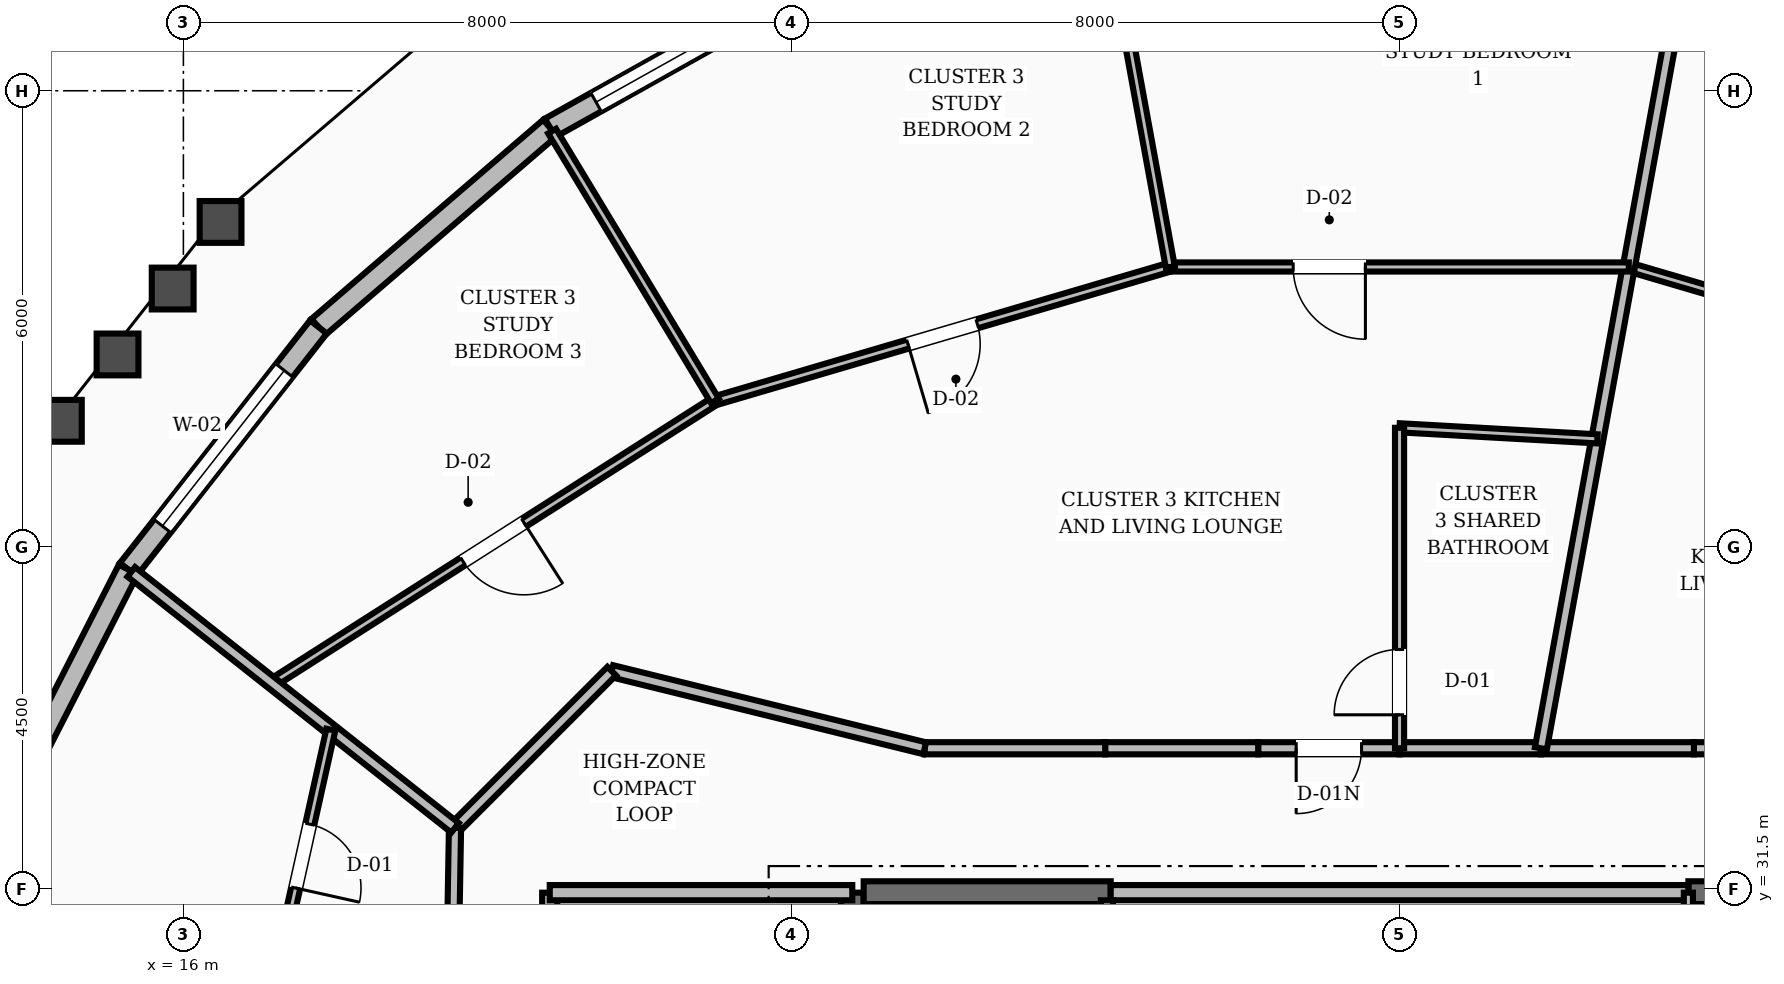
"""IFC4 building model, lengths in metres.
Left out: names, types, materials, properties, quantities, classifications, styles, units other than length and angle.
Written with IfcOpenShell. Run it as: python <this file> out.ifc"""

import sys

from ifc_helpers import new_model, si_unit, direction, frame, frame_2d, origin, place, context, subcontext, project, spatial, rectangle, extrude, element, fill, save


model = new_model("IFC4")
c1 = context("Model", 3, precision=1e-05, world=origin(), true_north=direction((0.0, 1.0)))
c2 = subcontext(c1, "Body", "Model", "MODEL_VIEW")
j1 = project(units=[si_unit("LENGTHUNIT", "METRE"), si_unit("PLANEANGLEUNIT", "RADIAN")], contexts=[c1])
p1 = place(None, origin())
s1 = spatial("IfcSite", under=j1, at=p1, CompositionType="ELEMENT")
p2 = place(p1, origin())
s2 = spatial("IfcBuilding", under=s1, at=p2, CompositionType="ELEMENT")
p3 = place(p2, frame((0.0, 0.0, 261.6)))
s3 = spatial("IfcBuildingStorey", under=s2, at=p3, CompositionType="ELEMENT", Elevation=261.6)
p4 = place(p3, frame((24.8, 25.15, 0.0), z_axis=(0.0, 0.0, 1.0), x_axis=(0.0, 1.0, 0.0)))
e1 = element("IfcWall", 1, at=p4, inside=s3, PredefinedType="SHEAR", context=c2, shape_type="SweptSolid", body=[
    extrude(rectangle(XDim=6.3, YDim=0.3, at=frame_2d((3.15, 0.0))), origin(), (0.0, 0.0, 1.0), 3.6),
])
p5 = place(p3, frame((24.95, 31.45, 0.0), z_axis=(0.0, 0.0, 1.0), x_axis=(1.0, 0.0, 0.0)))
e2 = element("IfcWall", 2, at=p5, inside=s3, PredefinedType="SHEAR", context=c2, shape_type="SweptSolid", body=[
    extrude(rectangle(XDim=3.25, YDim=0.3, at=frame_2d((1.625, 0.0))), origin(), (0.0, 0.0, 1.0), 3.6),
])
p6 = place(p3, frame((35.8, 31.45, 0.0), z_axis=(0.0, 0.0, 1.0), x_axis=(1.0, 0.0, 0.0)))
e3 = element("IfcWall", 3, at=p6, inside=s3, PredefinedType="SHEAR", context=c2, shape_type="SweptSolid", body=[
    extrude(rectangle(XDim=3.25, YDim=0.3, at=frame_2d((1.625, 0.0))), origin(), (0.0, 0.0, 1.0), 3.6),
])
p7 = place(p6, frame((0.3, 0.0, 0.0)))
e4 = element("IfcOpeningElement", 4, at=p7, cuts=e3, PredefinedType="OPENING", context=c2, shape_type="SweptSolid", body=[
    extrude(rectangle(XDim=1.1, YDim=2.1, at=frame_2d((0.55, 1.05))), frame((0.0, 0.16, 0.0), z_axis=(0.0, -1.0, 0.0), x_axis=(1.0, 0.0, 0.0)), (0.0, 0.0, 1.0), 0.32),
])
p8 = place(p3, frame((24.302, 43.458, 0.0), z_axis=(0.0, 0.0, 1.0), x_axis=(-0.872627171538, -0.488386956719, 0.0)))
e5 = element("IfcWall", 5, at=p8, inside=s3, PredefinedType="STANDARD", context=c2, shape_type="SweptSolid", body=[
    extrude(rectangle(XDim=3.985, YDim=0.28, at=frame_2d((1.993, 0.0))), origin(), (0.0, 0.0, 1.0), 2.88),
])
p9 = place(p8, frame((0.693, 0.0, 0.8)))
e6 = element("IfcOpeningElement", 6, at=p9, cuts=e5, PredefinedType="OPENING", context=c2, shape_type="SweptSolid", body=[
    extrude(rectangle(XDim=2.6, YDim=1.65, at=frame_2d((1.3, 0.825))), frame((0.0, 0.15, 0.0), z_axis=(0.0, -1.0, 0.0), x_axis=(1.0, 0.0, 0.0)), (0.0, 0.0, 1.0), 0.3),
])
p10 = place(p3, frame((20.825, 41.512, 0.0), z_axis=(0.0, 0.0, 1.0), x_axis=(-0.758458425967, -0.651721425212, 0.0)))
e7 = element("IfcWall", 7, at=p10, inside=s3, PredefinedType="STANDARD", context=c2, shape_type="SweptSolid", body=[
    extrude(rectangle(XDim=4.019, YDim=0.28, at=frame_2d((2.009, 0.0))), origin(), (0.0, 0.0, 1.0), 2.88),
])
p11 = place(p3, frame((17.777, 38.893, 0.0), z_axis=(0.0, 0.0, 1.0), x_axis=(-0.616903837432, -0.787038534864, 0.0)))
e8 = element("IfcWall", 8, at=p11, inside=s3, PredefinedType="STANDARD", context=c2, shape_type="SweptSolid", body=[
    extrude(rectangle(XDim=4.055, YDim=0.28, at=frame_2d((2.028, 0.0))), origin(), (0.0, 0.0, 1.0), 2.88),
])
p12 = place(p11, frame((0.728, 0.0, 0.8)))
e9 = element("IfcOpeningElement", 9, at=p12, cuts=e8, PredefinedType="OPENING", context=c2, shape_type="SweptSolid", body=[
    extrude(rectangle(XDim=2.6, YDim=1.65, at=frame_2d((1.3, 0.825))), frame((0.0, 0.15, 0.0), z_axis=(0.0, -1.0, 0.0), x_axis=(1.0, 0.0, 0.0)), (0.0, 0.0, 1.0), 0.3),
])
p13 = place(p3, frame((15.275, 35.701, 0.0), z_axis=(0.0, 0.0, 1.0), x_axis=(-0.454698544749, -0.89064540273, 0.0)))
e10 = element("IfcWall", 10, at=p13, inside=s3, PredefinedType="STANDARD", context=c2, shape_type="SweptSolid", body=[
    extrude(rectangle(XDim=4.088, YDim=0.28, at=frame_2d((2.044, 0.0))), origin(), (0.0, 0.0, 1.0), 2.88),
])
p14 = place(p3, frame((20.82, 28.32, 0.0), z_axis=(0.0, 0.0, 1.0), x_axis=(0.0, 1.0, 0.0)))
e11 = element("IfcWall", 11, at=p14, inside=s3, PredefinedType="SOLIDWALL", context=c2, shape_type="SweptSolid", body=[
    extrude(rectangle(XDim=3.13, YDim=0.2, at=frame_2d((1.565, 0.0))), origin(), (0.0, 0.0, 1.0), 2.87),
])
p15 = place(p14, frame((1.09, 0.0, 0.0)))
e12 = element("IfcOpeningElement", 12, at=p15, cuts=e11, PredefinedType="OPENING", context=c2, shape_type="SweptSolid", body=[
    extrude(rectangle(XDim=0.95, YDim=2.1, at=frame_2d((0.475, 1.05))), frame((0.0, 0.11, 0.0), z_axis=(0.0, -1.0, 0.0), x_axis=(1.0, 0.0, 0.0)), (0.0, 0.0, 1.0), 0.22),
])
p16 = place(p3, frame((20.82, 31.45, 0.0), z_axis=(0.0, 0.0, 1.0), x_axis=(1.0, 0.0, 0.0)))
e13 = element("IfcWall", 13, at=p16, inside=s3, PredefinedType="SOLIDWALL", context=c2, shape_type="SweptSolid", body=[
    extrude(rectangle(XDim=3.98, YDim=0.2, at=frame_2d((1.99, 0.0))), origin(), (0.0, 0.0, 1.0), 2.87),
])
p17 = place(p3, frame((28.2, 31.45, 0.0), z_axis=(0.0, 0.0, 1.0), x_axis=(1.0, 0.0, 0.0)))
e14 = element("IfcWall", 14, at=p17, inside=s3, PredefinedType="SOLIDWALL", context=c2, shape_type="SweptSolid", body=[
    extrude(rectangle(XDim=7.6, YDim=0.2, at=frame_2d((3.8, 0.0))), origin(), (0.0, 0.0, 1.0), 2.87),
])
p18 = place(p3, frame((35.8, 27.95, 0.0), z_axis=(0.0, 0.0, 1.0), x_axis=(0.0, 1.0, 0.0)))
e15 = element("IfcWall", 15, at=p18, inside=s3, PredefinedType="PARTITIONING", context=c2, shape_type="SweptSolid", body=[
    extrude(rectangle(XDim=3.5, YDim=0.12, at=frame_2d((1.75, 0.0))), origin(), (0.0, 0.0, 1.0), 2.87),
])
p19 = place(p18, frame((1.275, 0.0, 0.0)))
e16 = element("IfcOpeningElement", 16, at=p19, cuts=e15, PredefinedType="OPENING", context=c2, shape_type="SweptSolid", body=[
    extrude(rectangle(XDim=0.95, YDim=2.1, at=frame_2d((0.475, 1.05))), frame((0.0, 0.07, 0.0), z_axis=(0.0, -1.0, 0.0), x_axis=(1.0, 0.0, 0.0)), (0.0, 0.0, 1.0), 0.14),
])
p20 = place(p3, frame((28.15, 25.25, 0.0), z_axis=(0.0, 0.0, 1.0), x_axis=(0.0, 1.0, 0.0)))
e17 = element("IfcWall", 17, at=p20, inside=s3, PredefinedType="SOLIDWALL", context=c2, shape_type="SweptSolid", body=[
    extrude(rectangle(XDim=6.1, YDim=0.16, at=frame_2d((3.05, 0.0))), origin(), (0.0, 0.0, 1.0), 2.87),
])
p21 = place(p3, frame((38.248, 33.35, 0.0), z_axis=(0.0, 0.0, 1.0), x_axis=(-1.0, 0.0, 0.0)))
e18 = element("IfcWall", 18, at=p21, inside=s3, PredefinedType="SOLIDWALL", context=c2, shape_type="SweptSolid", body=[
    extrude(rectangle(XDim=2.375, YDim=0.16, at=frame_2d((1.188, 0.0))), origin(), (0.0, 0.0, 1.0), 2.87),
])
p22 = place(p3, frame((35.873, 33.35, 0.0), z_axis=(0.0, 0.0, 1.0), x_axis=(-1.0, 0.0, 0.0)))
e19 = element("IfcWall", 19, at=p22, inside=s3, PredefinedType="SOLIDWALL", context=c2, shape_type="SweptSolid", body=[
    extrude(rectangle(XDim=2.013, YDim=0.16, at=frame_2d((1.006, 0.0))), origin(), (0.0, 0.0, 1.0), 2.87),
])
p23 = place(p3, frame((33.86, 33.35, 0.0), z_axis=(0.0, 0.0, 1.0), x_axis=(-1.0, 0.0, 0.0)))
e20 = element("IfcWall", 20, at=p23, inside=s3, PredefinedType="SOLIDWALL", context=c2, shape_type="SweptSolid", body=[
    extrude(rectangle(XDim=1.86, YDim=0.16, at=frame_2d((0.93, 0.0))), origin(), (0.0, 0.0, 1.0), 2.87),
])
p24 = place(p3, frame((32.0, 33.35, 0.0), z_axis=(0.0, 0.0, 1.0), x_axis=(-1.0, 0.0, 0.0)))
e21 = element("IfcWall", 21, at=p24, inside=s3, PredefinedType="SOLIDWALL", context=c2, shape_type="SweptSolid", body=[
    extrude(rectangle(XDim=1.86, YDim=0.16, at=frame_2d((0.93, 0.0))), origin(), (0.0, 0.0, 1.0), 2.87),
])
p25 = place(p24, frame((0.5, 0.0, 0.0)))
e22 = element("IfcOpeningElement", 22, at=p25, cuts=e21, PredefinedType="OPENING", context=c2, shape_type="SweptSolid", body=[
    extrude(rectangle(XDim=0.86, YDim=2.1, at=frame_2d((0.43, 1.05))), frame((0.0, 0.09, 0.0), z_axis=(0.0, -1.0, 0.0), x_axis=(1.0, 0.0, 0.0)), (0.0, 0.0, 1.0), 0.18),
])
p26 = place(p3, frame((30.14, 33.35, 0.0), z_axis=(0.0, 0.0, 1.0), x_axis=(-1.0, 0.0, 0.0)))
e23 = element("IfcWall", 23, at=p26, inside=s3, PredefinedType="SOLIDWALL", context=c2, shape_type="SweptSolid", body=[
    extrude(rectangle(XDim=2.013, YDim=0.16, at=frame_2d((1.006, 0.0))), origin(), (0.0, 0.0, 1.0), 2.87),
])
p27 = place(p3, frame((28.127, 33.35, 0.0), z_axis=(0.0, 0.0, 1.0), x_axis=(-1.0, 0.0, 0.0)))
e24 = element("IfcWall", 24, at=p27, inside=s3, PredefinedType="SOLIDWALL", context=c2, shape_type="SweptSolid", body=[
    extrude(rectangle(XDim=2.375, YDim=0.16, at=frame_2d((1.188, 0.0))), origin(), (0.0, 0.0, 1.0), 2.87),
])
p28 = place(p3, frame((25.752, 33.35, 0.0), z_axis=(0.0, 0.0, 1.0), x_axis=(-0.970939799552, 0.239323850978, 0.0)))
e25 = element("IfcWall", 25, at=p28, inside=s3, PredefinedType="SOLIDWALL", context=c2, shape_type="SweptSolid", body=[
    extrude(rectangle(XDim=4.241, YDim=0.16, at=frame_2d((2.12, 0.0))), origin(), (0.0, 0.0, 1.0), 2.87),
])
p29 = place(p3, frame((21.635, 34.365, 0.0), z_axis=(0.0, 0.0, 1.0), x_axis=(-0.707106781187, -0.707106781187, 0.0)))
e26 = element("IfcWall", 26, at=p29, inside=s3, PredefinedType="SOLIDWALL", context=c2, shape_type="SweptSolid", body=[
    extrude(rectangle(XDim=2.916, YDim=0.16, at=frame_2d((1.458, 0.0))), origin(), (0.0, 0.0, 1.0), 2.87),
])
p30 = place(p3, frame((19.573, 32.303, 0.0), z_axis=(0.0, 0.0, 1.0), x_axis=(-0.016981035134, -0.999855811828, 0.0)))
e27 = element("IfcWall", 27, at=p30, inside=s3, PredefinedType="SOLIDWALL", context=c2, shape_type="SweptSolid", body=[
    extrude(rectangle(XDim=3.134, YDim=0.16, at=frame_2d((1.567, 0.0))), origin(), (0.0, 0.0, 1.0), 2.87),
])
p31 = place(p3, frame((41.007, 37.921, 0.0), z_axis=(0.0, 0.0, 1.0), x_axis=(-0.959414668212, 0.281999103578, 0.0)))
e28 = element("IfcWall", 28, at=p31, inside=s3, PredefinedType="PARTITIONING", context=c2, shape_type="SweptSolid", body=[
    extrude(rectangle(XDim=6.245, YDim=0.12, at=frame_2d((3.122, 0.0))), origin(), (0.0, 0.0, 1.0), 2.87),
])
p32 = place(p31, frame((2.647, 0.0, 0.0)))
e29 = element("IfcOpeningElement", 29, at=p32, cuts=e28, PredefinedType="OPENING", context=c2, shape_type="SweptSolid", body=[
    extrude(rectangle(XDim=0.95, YDim=2.1, at=frame_2d((0.475, 1.05))), frame((0.0, 0.07, 0.0), z_axis=(0.0, -1.0, 0.0), x_axis=(1.0, 0.0, 0.0)), (0.0, 0.0, 1.0), 0.14),
])
p33 = place(p3, frame((33.86, 33.35, 0.0), z_axis=(0.0, 0.0, 1.0), x_axis=(0.17961571379, 0.9837368527, 0.0)))
e30 = element("IfcWall", 30, at=p33, inside=s3, PredefinedType="SOLIDWALL", context=c2, shape_type="SweptSolid", body=[
    extrude(rectangle(XDim=11.443, YDim=0.16, at=frame_2d((5.722, 0.0))), origin(), (0.0, 0.0, 1.0), 2.87),
])
p34 = place(p3, frame((34.603, 37.42, 0.0), z_axis=(0.0, 0.0, 1.0), x_axis=(-0.998441277422, 0.055812324268, 0.0)))
e31 = element("IfcWall", 31, at=p34, inside=s3, PredefinedType="PARTITIONING", context=c2, shape_type="SweptSolid", body=[
    extrude(rectangle(XDim=2.607, YDim=0.12, at=frame_2d((1.304, 0.0))), origin(), (0.0, 0.0, 1.0), 2.87),
])
p35 = place(p3, frame((32.0, 33.35, 0.0), z_axis=(0.0, 0.0, 1.0), x_axis=(0.0, 1.0, 0.0)))
e32 = element("IfcWall", 32, at=p35, inside=s3, PredefinedType="PARTITIONING", context=c2, shape_type="SweptSolid", body=[
    extrude(rectangle(XDim=4.216, YDim=0.12, at=frame_2d((2.108, 0.0))), origin(), (0.0, 0.0, 1.0), 2.87),
])
p36 = place(p35, frame((0.44, 0.0, 0.0)))
e33 = element("IfcOpeningElement", 33, at=p36, cuts=e32, PredefinedType="OPENING", context=c2, shape_type="SweptSolid", body=[
    extrude(rectangle(XDim=0.86, YDim=2.1, at=frame_2d((0.43, 1.05))), frame((0.0, 0.07, 0.0), z_axis=(0.0, -1.0, 0.0), x_axis=(1.0, 0.0, 0.0)), (0.0, 0.0, 1.0), 0.14),
])
p37 = place(p3, frame((35.016, 39.682, 0.0), z_axis=(0.0, 0.0, 1.0), x_axis=(-1.0, 0.0, 0.0)))
e34 = element("IfcWall", 34, at=p37, inside=s3, PredefinedType="PARTITIONING", context=c2, shape_type="SweptSolid", body=[
    extrude(rectangle(XDim=6.032, YDim=0.12, at=frame_2d((3.016, 0.0))), origin(), (0.0, 0.0, 1.0), 2.87),
])
p38 = place(p37, frame((3.465, 0.0, 0.0)))
e35 = element("IfcOpeningElement", 35, at=p38, cuts=e34, PredefinedType="OPENING", context=c2, shape_type="SweptSolid", body=[
    extrude(rectangle(XDim=0.95, YDim=2.1, at=frame_2d((0.475, 1.05))), frame((0.0, 0.07, 0.0), z_axis=(0.0, -1.0, 0.0), x_axis=(1.0, 0.0, 0.0)), (0.0, 0.0, 1.0), 0.14),
])
p39 = place(p3, frame((28.984, 39.682, 0.0), z_axis=(0.0, 0.0, 1.0), x_axis=(-0.959414668212, -0.281999103578, 0.0)))
e36 = element("IfcWall", 36, at=p39, inside=s3, PredefinedType="PARTITIONING", context=c2, shape_type="SweptSolid", body=[
    extrude(rectangle(XDim=6.245, YDim=0.12, at=frame_2d((3.122, 0.0))), origin(), (0.0, 0.0, 1.0), 2.87),
])
p40 = place(p39, frame((2.647, 0.0, 0.0)))
e37 = element("IfcOpeningElement", 37, at=p40, cuts=e36, PredefinedType="OPENING", context=c2, shape_type="SweptSolid", body=[
    extrude(rectangle(XDim=0.95, YDim=2.1, at=frame_2d((0.475, 1.05))), frame((0.0, 0.07, 0.0), z_axis=(0.0, -1.0, 0.0), x_axis=(1.0, 0.0, 0.0)), (0.0, 0.0, 1.0), 0.14),
])
p41 = place(p3, frame((28.984, 39.682, 0.0), z_axis=(0.0, 0.0, 1.0), x_axis=(-0.179623384496, 0.983735452112, 0.0)))
e38 = element("IfcWall", 38, at=p41, inside=s3, PredefinedType="PARTITIONING", context=c2, shape_type="SweptSolid", body=[
    extrude(rectangle(XDim=5.007, YDim=0.12, at=frame_2d((2.504, 0.0))), origin(), (0.0, 0.0, 1.0), 2.87),
])
p42 = place(p3, frame((22.993, 37.921, 0.0), z_axis=(0.0, 0.0, 1.0), x_axis=(-0.843220391553, -0.537568015482, 0.0)))
e39 = element("IfcWall", 39, at=p42, inside=s3, PredefinedType="PARTITIONING", context=c2, shape_type="SweptSolid", body=[
    extrude(rectangle(XDim=6.91, YDim=0.12, at=frame_2d((3.455, 0.0))), origin(), (0.0, 0.0, 1.0), 2.87),
])
p43 = place(p42, frame((2.98, 0.0, 0.0)))
e40 = element("IfcOpeningElement", 40, at=p43, cuts=e39, PredefinedType="OPENING", context=c2, shape_type="SweptSolid", body=[
    extrude(rectangle(XDim=0.95, YDim=2.1, at=frame_2d((0.475, 1.05))), frame((0.0, 0.07, 0.0), z_axis=(0.0, -1.0, 0.0), x_axis=(1.0, 0.0, 0.0)), (0.0, 0.0, 1.0), 0.14),
])
p44 = place(p3, frame((22.993, 37.921, 0.0), z_axis=(0.0, 0.0, 1.0), x_axis=(-0.516901675456, 0.856044775646, 0.0)))
e41 = element("IfcWall", 41, at=p44, inside=s3, PredefinedType="PARTITIONING", context=c2, shape_type="SweptSolid", body=[
    extrude(rectangle(XDim=4.145, YDim=0.12, at=frame_2d((2.073, 0.0))), origin(), (0.0, 0.0, 1.0), 2.87),
])
p45 = place(p3, frame((19.573, 32.303, 0.0), z_axis=(0.0, 0.0, 1.0), x_axis=(-0.784496994248, 0.6201326197, 0.0)))
e42 = element("IfcWall", 42, at=p45, inside=s3, PredefinedType="SOLIDWALL", context=c2, shape_type="SweptSolid", body=[
    extrude(rectangle(XDim=5.429, YDim=0.16, at=frame_2d((2.714, 0.0))), origin(), (0.0, 0.0, 1.0), 2.87),
])
p46 = place(p3, frame((17.94, 33.594, 0.0), z_axis=(0.0, 0.0, 1.0), x_axis=(-0.216998726361, -0.976171886892, 0.0)))
e43 = element("IfcWall", 43, at=p46, inside=s3, PredefinedType="PARTITIONING", context=c2, shape_type="SweptSolid", body=[
    extrude(rectangle(XDim=3.408, YDim=0.12, at=frame_2d((1.704, 0.0))), origin(), (0.0, 0.0, 1.0), 2.87),
])
p47 = place(p46, frame((1.274, 0.0, 0.0)))
e44 = element("IfcOpeningElement", 44, at=p47, cuts=e43, PredefinedType="OPENING", context=c2, shape_type="SweptSolid", body=[
    extrude(rectangle(XDim=0.86, YDim=2.1, at=frame_2d((0.43, 1.05))), frame((0.0, 0.07, 0.0), z_axis=(0.0, -1.0, 0.0), x_axis=(1.0, 0.0, 0.0)), (0.0, 0.0, 1.0), 0.14),
])
p48 = place(p9, origin())
e45 = element("IfcWindow", 45, at=p48, inside=s3, PartitioningType="SINGLE_PANEL", PredefinedType="WINDOW", context=c2, shape_type="SweptSolid", body=[
    extrude(rectangle(XDim=2.6, YDim=1.65, at=frame_2d((1.3, 0.825))), frame((0.0, 0.03, 0.0), z_axis=(0.0, -1.0, 0.0), x_axis=(1.0, 0.0, 0.0)), (0.0, 0.0, 1.0), 0.06),
])
fill(e6, e45)
p49 = place(p12, origin())
e46 = element("IfcWindow", 46, at=p49, inside=s3, PartitioningType="SINGLE_PANEL", PredefinedType="WINDOW", context=c2, shape_type="SweptSolid", body=[
    extrude(rectangle(XDim=2.6, YDim=1.65, at=frame_2d((1.3, 0.825))), frame((0.0, 0.03, 0.0), z_axis=(0.0, -1.0, 0.0), x_axis=(1.0, 0.0, 0.0)), (0.0, 0.0, 1.0), 0.06),
])
fill(e9, e46)
p50 = place(p36, origin())
e47 = element("IfcDoor", 47, at=p50, inside=s3, OperationType="SINGLE_SWING_LEFT", PredefinedType="DOOR", context=c2, shape_type="SweptSolid", body=[
    extrude(rectangle(XDim=0.86, YDim=2.1, at=frame_2d((0.43, 1.05))), frame((0.0, 0.025, 0.0), z_axis=(0.0, -1.0, 0.0), x_axis=(1.0, 0.0, 0.0)), (0.0, 0.0, 1.0), 0.05),
])
fill(e33, e47)
p51 = place(p25, origin())
e48 = element("IfcDoor", 48, at=p51, inside=s3, OperationType="SINGLE_SWING_RIGHT", PredefinedType="DOOR", context=c2, shape_type="SweptSolid", body=[
    extrude(rectangle(XDim=0.86, YDim=2.1, at=frame_2d((0.43, 1.05))), frame((0.0, 0.025, 0.0), z_axis=(0.0, -1.0, 0.0), x_axis=(1.0, 0.0, 0.0)), (0.0, 0.0, 1.0), 0.05),
])
fill(e22, e48)
p52 = place(p38, origin())
e49 = element("IfcDoor", 49, at=p52, inside=s3, OperationType="SINGLE_SWING_LEFT", PredefinedType="DOOR", context=c2, shape_type="SweptSolid", body=[
    extrude(rectangle(XDim=0.95, YDim=2.1, at=frame_2d((0.475, 1.05))), frame((0.0, 0.025, 0.0), z_axis=(0.0, -1.0, 0.0), x_axis=(1.0, 0.0, 0.0)), (0.0, 0.0, 1.0), 0.05),
])
fill(e35, e49)
p53 = place(p40, origin())
e50 = element("IfcDoor", 50, at=p53, inside=s3, OperationType="SINGLE_SWING_RIGHT", PredefinedType="DOOR", context=c2, shape_type="SweptSolid", body=[
    extrude(rectangle(XDim=0.95, YDim=2.1, at=frame_2d((0.475, 1.05))), frame((0.0, 0.025, 0.0), z_axis=(0.0, -1.0, 0.0), x_axis=(1.0, 0.0, 0.0)), (0.0, 0.0, 1.0), 0.05),
])
fill(e37, e50)
p54 = place(p43, origin())
e51 = element("IfcDoor", 51, at=p54, inside=s3, OperationType="SINGLE_SWING_LEFT", PredefinedType="DOOR", context=c2, shape_type="SweptSolid", body=[
    extrude(rectangle(XDim=0.95, YDim=2.1, at=frame_2d((0.475, 1.05))), frame((0.0, 0.025, 0.0), z_axis=(0.0, -1.0, 0.0), x_axis=(1.0, 0.0, 0.0)), (0.0, 0.0, 1.0), 0.05),
])
fill(e40, e51)
p55 = place(p47, origin())
e52 = element("IfcDoor", 52, at=p55, inside=s3, OperationType="SINGLE_SWING_RIGHT", PredefinedType="DOOR", context=c2, shape_type="SweptSolid", body=[
    extrude(rectangle(XDim=0.86, YDim=2.1, at=frame_2d((0.43, 1.05))), frame((0.0, 0.025, 0.0), z_axis=(0.0, -1.0, 0.0), x_axis=(1.0, 0.0, 0.0)), (0.0, 0.0, 1.0), 0.05),
])
fill(e44, e52)
save(model, sys.argv[1])
